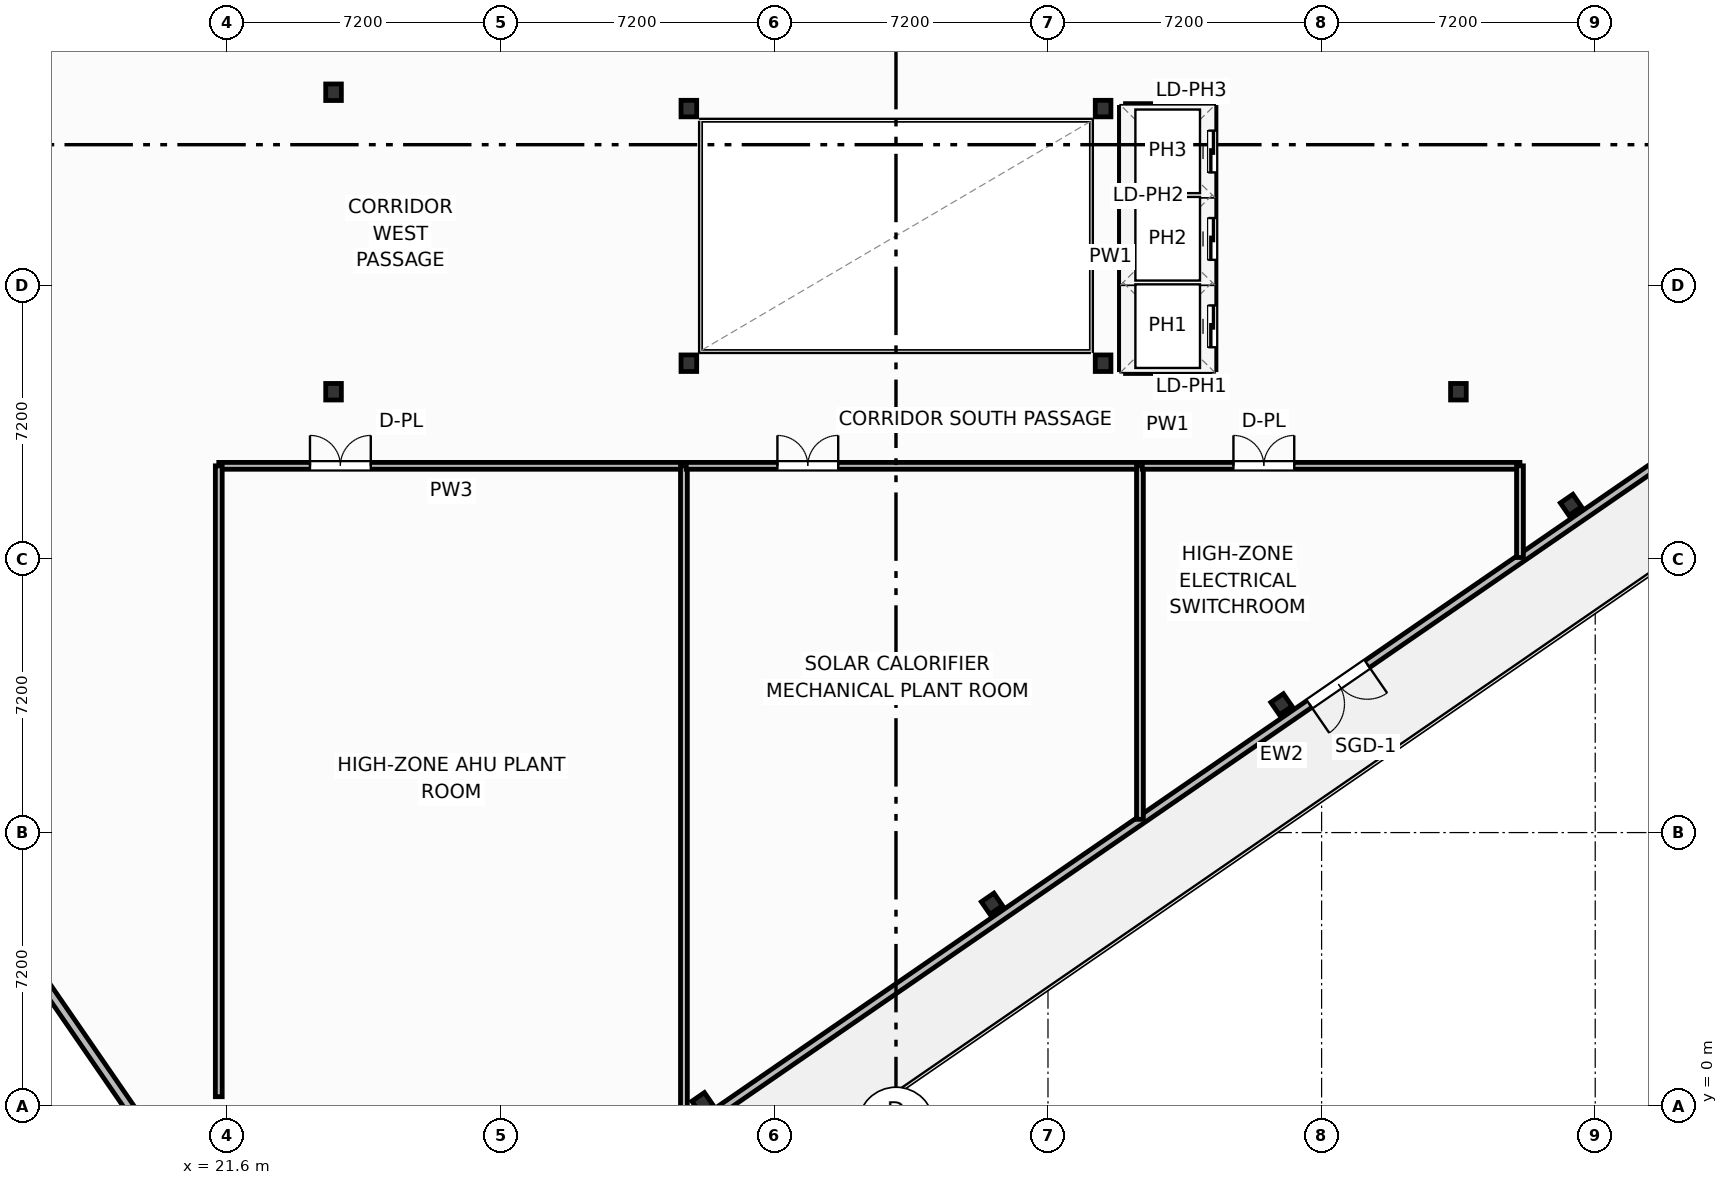
"""IFC4 building model, lengths in metres.
Left out: names, types, materials, properties, quantities, classifications, styles, units other than length and angle.
Written with IfcOpenShell. Run it as: python <this file> out.ifc"""

import sys

from ifc_helpers import new_model, si_unit, direction, frame, frame_2d, origin, origin_2d, place, context, subcontext, project, spatial, rectangle, i_section, extrude, element, fill, save


model = new_model("IFC4")
c1 = context("Model", 3, precision=1e-05, world=origin(), true_north=direction((0.0, 1.0)))
c2 = subcontext(c1, "Body", "Model", "MODEL_VIEW")
j1 = project(units=[si_unit("LENGTHUNIT", "METRE"), si_unit("PLANEANGLEUNIT", "RADIAN")], contexts=[c1])
p1 = place(None, origin())
s1 = spatial("IfcSite", under=j1, at=p1, CompositionType="ELEMENT")
p2 = place(p1, origin())
s2 = spatial("IfcBuilding", under=s1, at=p2, CompositionType="ELEMENT")
p3 = place(p2, frame((0.0, 0.0, 253.4)))
s3 = spatial("IfcBuildingStorey", under=s2, at=p3, CompositionType="ELEMENT", Elevation=253.4)
for number, where, z_axis, x_axis in (
    (1, (33.75, 19.55, 0.0), (0.0, 0.0, 1.0), (1.0, 0.0, 0.0)),
    (2, (44.65, 19.55, 0.0), (0.0, 0.0, 1.0), (1.0, 0.0, 0.0)),
    (3, (33.75, 26.25, 0.0), (0.0, 0.0, 1.0), (1.0, 0.0, 0.0)),
    (4, (44.65, 26.25, 0.0), (0.0, 0.0, 1.0), (1.0, 0.0, 0.0)),
    (5, (24.4, 18.8, 0.0), (0.0, 0.0, 1.0), (1.0, 0.0, 0.0)),
    (6, (24.4, 26.68, 0.0), (0.0, 0.0, 1.0), (1.0, 0.0, 0.0)),
    (7, (54.0, 18.8, 0.0), (0.0, 0.0, 1.0), (1.0, 0.0, 0.0)),
):
    element("IfcColumn", number, at=place(p3, frame(where, z_axis=z_axis, x_axis=x_axis)), inside=s3, PredefinedType="COLUMN", context=c2, shape_type="SweptSolid", body=[
        extrude(i_section(OverallWidth=0.412, OverallDepth=0.435, WebThickness=0.036, FlangeThickness=0.057, FilletRadius=0.025, at=origin_2d()), origin(), (0.0, 0.0, 1.0), 4.8),
    ])
for number, where, z_axis, x_axis in (
    (8, (34.107, 0.081, -0.32), (0.0, 0.0, 1.0), (0.824, 0.567, 0.0)),
    (9, (41.725, 5.328, -0.32), (0.0, 0.0, 1.0), (0.824, 0.567, 0.0)),
    (10, (49.343, 10.575, -0.32), (0.0, 0.0, 1.0), (0.824, 0.567, 0.0)),
    (11, (56.96, 15.823, -0.32), (0.0, 0.0, 1.0), (0.824, 0.567, 0.0)),
):
    element("IfcColumn", number, at=place(p3, frame(where, z_axis=z_axis, x_axis=x_axis)), inside=s3, PredefinedType="COLUMN", context=c2, shape_type="SweptSolid", body=[
        extrude(i_section(OverallWidth=0.401, OverallDepth=0.399, WebThickness=0.025, FlangeThickness=0.04, FilletRadius=0.022, at=origin_2d()), origin(), (0.0, 0.0, 1.0), 5.12),
    ])
p4 = place(p3, frame((71.07, 25.043, 0.0), z_axis=(0.0, 0.0, 1.0), x_axis=(-0.82353435434, -0.567266398812, 0.0)))
e12 = element("IfcWall", 12, at=p4, inside=s3, PredefinedType="SOLIDWALL", context=c2, shape_type="SweptSolid", body=[
    extrude(rectangle(XDim=52.2, YDim=0.22, at=frame_2d((26.1, 0.0))), origin(), (0.0, 0.0, 1.0), 3.83),
])
p5 = place(p4, frame((23.64, 0.0, 0.0)))
e13 = element("IfcOpeningElement", 13, at=p5, cuts=e12, PredefinedType="OPENING", context=c2, shape_type="SweptSolid", body=[
    extrude(rectangle(XDim=1.85, YDim=2.3, at=frame_2d((0.925, 1.15))), frame((0.0, 0.12, 0.0), z_axis=(0.0, -1.0, 0.0), x_axis=(1.0, 0.0, 0.0)), (0.0, 0.0, 1.0), 0.24),
])
p6 = place(p4, frame((0.55, 0.0, 0.75)))
e14 = element("IfcOpeningElement", 14, at=p6, cuts=e12, PredefinedType="OPENING", context=c2, shape_type="SweptSolid", body=[
    extrude(rectangle(XDim=1.85, YDim=1.75, at=frame_2d((0.925, 0.875))), frame((0.0, 0.12, 0.0), z_axis=(0.0, -1.0, 0.0), x_axis=(1.0, 0.0, 0.0)), (0.0, 0.0, 1.0), 0.24),
])
p7 = place(p4, frame((49.8, 0.0, 0.75)))
e15 = element("IfcOpeningElement", 15, at=p7, cuts=e12, PredefinedType="OPENING", context=c2, shape_type="SweptSolid", body=[
    extrude(rectangle(XDim=1.85, YDim=1.75, at=frame_2d((0.925, 0.875))), frame((0.0, 0.12, 0.0), z_axis=(0.0, -1.0, 0.0), x_axis=(1.0, 0.0, 0.0)), (0.0, 0.0, 1.0), 0.24),
])
p8 = place(p3, frame((7.331, 25.557, 0.0), z_axis=(0.0, 0.0, 1.0), x_axis=(0.823530664362, 0.567271755735, 0.0)))
e16 = element("IfcWall", 16, at=p8, inside=s3, PredefinedType="SOLIDWALL", context=c2, shape_type="SweptSolid", body=[
    extrude(rectangle(XDim=52.2, YDim=0.22, at=frame_2d((26.1, 0.0))), origin(), (0.0, 0.0, 1.0), 3.83),
])
p9 = place(p8, frame((28.025, 0.0, 0.0)))
e17 = element("IfcOpeningElement", 17, at=p9, cuts=e16, PredefinedType="OPENING", context=c2, shape_type="SweptSolid", body=[
    extrude(rectangle(XDim=1.85, YDim=2.3, at=frame_2d((0.925, 1.15))), frame((0.0, 0.12, 0.0), z_axis=(0.0, -1.0, 0.0), x_axis=(1.0, 0.0, 0.0)), (0.0, 0.0, 1.0), 0.24),
])
p10 = place(p8, frame((0.55, 0.0, 0.75)))
e18 = element("IfcOpeningElement", 18, at=p10, cuts=e16, PredefinedType="OPENING", context=c2, shape_type="SweptSolid", body=[
    extrude(rectangle(XDim=1.85, YDim=1.75, at=frame_2d((0.925, 0.875))), frame((0.0, 0.12, 0.0), z_axis=(0.0, -1.0, 0.0), x_axis=(1.0, 0.0, 0.0)), (0.0, 0.0, 1.0), 0.24),
])
p11 = place(p8, frame((49.8, 0.0, 0.75)))
e19 = element("IfcOpeningElement", 19, at=p11, cuts=e16, PredefinedType="OPENING", context=c2, shape_type="SweptSolid", body=[
    extrude(rectangle(XDim=1.85, YDim=1.75, at=frame_2d((0.925, 0.875))), frame((0.0, 0.12, 0.0), z_axis=(0.0, -1.0, 0.0), x_axis=(1.0, 0.0, 0.0)), (0.0, 0.0, 1.0), 0.24),
])
p12 = place(p3, frame((5.764, 19.229, 0.0), z_axis=(0.0, 0.0, 1.0), x_axis=(0.567265985498, -0.823534639039, 0.0)))
e20 = element("IfcWall", 20, at=p12, inside=s3, PredefinedType="SOLIDWALL", context=c2, shape_type="SweptSolid", body=[
    extrude(rectangle(XDim=27.934, YDim=0.24, at=frame_2d((13.967, 0.0))), origin(), (0.0, 0.0, 1.0), 3.83),
])
p13 = place(p3, frame((21.38, 16.85, 0.0), z_axis=(0.0, 0.0, 1.0), x_axis=(1.0, 0.0, 0.0)))
e21 = element("IfcWall", 21, at=p13, inside=s3, PredefinedType="PARTITIONING", context=c2, shape_type="SweptSolid", body=[
    extrude(rectangle(XDim=12.24, YDim=0.18, at=frame_2d((6.12, 0.0))), origin(), (0.0, 0.0, 1.0), 4.55),
])
p14 = place(p13, frame((2.4, 0.0, 0.0)))
e22 = element("IfcOpeningElement", 22, at=p14, cuts=e21, PredefinedType="OPENING", context=c2, shape_type="SweptSolid", body=[
    extrude(rectangle(XDim=1.6, YDim=2.05, at=frame_2d((0.8, 1.025))), frame((0.0, 0.1, 0.0), z_axis=(0.0, -1.0, 0.0), x_axis=(1.0, 0.0, 0.0)), (0.0, 0.0, 1.0), 0.2),
])
p15 = place(p3, frame((33.62, -0.713, 0.0), z_axis=(0.0, 0.0, 1.0), x_axis=(0.0, 1.0, 0.0)))
e23 = element("IfcWall", 23, at=p15, inside=s3, PredefinedType="PARTITIONING", context=c2, shape_type="SweptSolid", body=[
    extrude(rectangle(XDim=17.563, YDim=0.18, at=frame_2d((8.781, 0.0))), origin(), (0.0, 0.0, 1.0), 3.839),
])
p16 = place(p3, frame((21.38, 0.25, 0.0), z_axis=(0.0, 0.0, 1.0), x_axis=(0.0, 1.0, 0.0)))
e24 = element("IfcWall", 24, at=p16, inside=s3, PredefinedType="PARTITIONING", context=c2, shape_type="SweptSolid", body=[
    extrude(rectangle(XDim=16.6, YDim=0.18, at=frame_2d((8.3, 0.0))), origin(), (0.0, 0.0, 1.0), 4.55),
])
p17 = place(p3, frame((33.68, 16.85, 0.0), z_axis=(0.0, 0.0, 1.0), x_axis=(1.0, 0.0, 0.0)))
e25 = element("IfcWall", 25, at=p17, inside=s3, PredefinedType="PARTITIONING", context=c2, shape_type="SweptSolid", body=[
    extrude(rectangle(XDim=11.94, YDim=0.18, at=frame_2d((5.97, 0.0))), origin(), (0.0, 0.0, 1.0), 4.55),
])
p18 = place(p17, frame((2.4, 0.0, 0.0)))
e26 = element("IfcOpeningElement", 26, at=p18, cuts=e25, PredefinedType="OPENING", context=c2, shape_type="SweptSolid", body=[
    extrude(rectangle(XDim=1.6, YDim=2.05, at=frame_2d((0.8, 1.025))), frame((0.0, 0.1, 0.0), z_axis=(0.0, -1.0, 0.0), x_axis=(1.0, 0.0, 0.0)), (0.0, 0.0, 1.0), 0.2),
])
p19 = place(p3, frame((45.62, 7.55, 0.0), z_axis=(0.0, 0.0, 1.0), x_axis=(0.0, 1.0, 0.0)))
e27 = element("IfcWall", 27, at=p19, inside=s3, PredefinedType="PARTITIONING", context=c2, shape_type="SweptSolid", body=[
    extrude(rectangle(XDim=9.301, YDim=0.18, at=frame_2d((4.65, 0.0))), origin(), (0.0, 0.0, 1.0), 4.55),
])
p20 = place(p3, frame((45.68, 16.85, 0.0), z_axis=(0.0, 0.0, 1.0), x_axis=(1.0, 0.0, 0.0)))
e28 = element("IfcWall", 28, at=p20, inside=s3, PredefinedType="PARTITIONING", context=c2, shape_type="SweptSolid", body=[
    extrude(rectangle(XDim=9.94, YDim=0.18, at=frame_2d((4.97, 0.0))), origin(), (0.0, 0.0, 1.0), 4.55),
])
p21 = place(p20, frame((2.4, 0.0, 0.0)))
e29 = element("IfcOpeningElement", 29, at=p21, cuts=e28, PredefinedType="OPENING", context=c2, shape_type="SweptSolid", body=[
    extrude(rectangle(XDim=1.6, YDim=2.05, at=frame_2d((0.8, 1.025))), frame((0.0, 0.1, 0.0), z_axis=(0.0, -1.0, 0.0), x_axis=(1.0, 0.0, 0.0)), (0.0, 0.0, 1.0), 0.2),
])
p22 = place(p3, frame((55.62, 14.438, 0.0), z_axis=(0.0, 0.0, 1.0), x_axis=(0.0, 1.0, 0.0)))
e30 = element("IfcWall", 30, at=p22, inside=s3, PredefinedType="PARTITIONING", context=c2, shape_type="SweptSolid", body=[
    extrude(rectangle(XDim=2.412, YDim=0.18, at=frame_2d((1.206, 0.0))), origin(), (0.0, 0.0, 1.0), 4.55),
])
for number, where, z_axis, x_axis in (
    (31, (45.24, 21.675, 0.0), (0.0, 0.0, 1.0), (1.0, 0.0, 0.0)),
    (32, (45.24, 23.975, 0.0), (0.0, 0.0, 1.0), (1.0, 0.0, 0.0)),
):
    element("IfcWall", number, at=place(p3, frame(where, z_axis=z_axis, x_axis=x_axis)), inside=s3, PredefinedType="PARTITIONING", context=c2, shape_type="SweptSolid", body=[
        extrude(rectangle(XDim=2.22, YDim=0.2, at=frame_2d((1.11, 0.0))), origin(), (0.0, 0.0, 1.0), 4.55),
    ])
p23 = place(p3, frame((45.24, 19.38, 0.0), z_axis=(0.0, 0.0, 1.0), x_axis=(1.0, 0.0, 0.0)))
e33 = element("IfcWall", 33, at=p23, inside=s3, PredefinedType="PARTITIONING", context=c2, shape_type="SweptSolid", body=[
    extrude(rectangle(XDim=2.22, YDim=0.2, at=frame_2d((1.11, 0.0))), origin(), (0.0, 0.0, 1.0), 3.762),
])
p24 = place(p3, frame((45.24, 26.28, 0.0), z_axis=(0.0, 0.0, 1.0), x_axis=(1.0, 0.0, 0.0)))
e34 = element("IfcWall", 34, at=p24, inside=s3, PredefinedType="PARTITIONING", context=c2, shape_type="SweptSolid", body=[
    extrude(rectangle(XDim=2.22, YDim=0.2, at=frame_2d((1.11, 0.0))), origin(), (0.0, 0.0, 1.0), 4.55),
])
p25 = place(p3, frame((45.18, 19.38, 0.0), z_axis=(0.0, 0.0, 1.0), x_axis=(0.0, 1.0, 0.0)))
e35 = element("IfcWall", 35, at=p25, inside=s3, PredefinedType="PARTITIONING", context=c2, shape_type="SweptSolid", body=[
    extrude(rectangle(XDim=6.9, YDim=0.2, at=frame_2d((3.45, 0.0))), origin(), (0.0, 0.0, 1.0), 4.55),
])
p26 = place(p3, frame((47.52, 19.38, 0.0), z_axis=(0.0, 0.0, 1.0), x_axis=(0.0, 1.0, 0.0)))
e36 = element("IfcWall", 36, at=p26, inside=s3, PredefinedType="PARTITIONING", context=c2, shape_type="SweptSolid", body=[
    extrude(rectangle(XDim=6.9, YDim=0.2, at=frame_2d((3.45, 0.0))), origin(), (0.0, 0.0, 1.0), 4.55),
])
p27 = place(p26, frame((0.59, 0.0, 0.0)))
e37 = element("IfcOpeningElement", 37, at=p27, cuts=e36, PredefinedType="OPENING", context=c2, shape_type="SweptSolid", body=[
    extrude(rectangle(XDim=1.1, YDim=2.15, at=frame_2d((0.55, 1.075))), frame((0.0, 0.11, 0.0), z_axis=(0.0, -1.0, 0.0), x_axis=(1.0, 0.0, 0.0)), (0.0, 0.0, 1.0), 0.22),
])
p28 = place(p26, frame((2.89, 0.0, 0.0)))
e38 = element("IfcOpeningElement", 38, at=p28, cuts=e36, PredefinedType="OPENING", context=c2, shape_type="SweptSolid", body=[
    extrude(rectangle(XDim=1.1, YDim=2.15, at=frame_2d((0.55, 1.075))), frame((0.0, 0.11, 0.0), z_axis=(0.0, -1.0, 0.0), x_axis=(1.0, 0.0, 0.0)), (0.0, 0.0, 1.0), 0.22),
])
p29 = place(p26, frame((5.19, 0.0, 0.0)))
e39 = element("IfcOpeningElement", 39, at=p29, cuts=e36, PredefinedType="OPENING", context=c2, shape_type="SweptSolid", body=[
    extrude(rectangle(XDim=1.1, YDim=2.15, at=frame_2d((0.55, 1.075))), frame((0.0, 0.11, 0.0), z_axis=(0.0, -1.0, 0.0), x_axis=(1.0, 0.0, 0.0)), (0.0, 0.0, 1.0), 0.22),
])
p30 = place(p5, origin())
e40 = element("IfcDoor", 40, at=p30, inside=s3, OperationType="DOUBLE_DOOR_SINGLE_SWING", PredefinedType="DOOR", context=c2, shape_type="SweptSolid", body=[
    extrude(rectangle(XDim=1.85, YDim=2.3, at=frame_2d((0.925, 1.15))), frame((0.0, 0.025, 0.0), z_axis=(0.0, -1.0, 0.0), x_axis=(1.0, 0.0, 0.0)), (0.0, 0.0, 1.0), 0.05),
])
fill(e13, e40)
p31 = place(p14, origin())
e41 = element("IfcDoor", 41, at=p31, inside=s3, OperationType="DOUBLE_DOOR_SINGLE_SWING", PredefinedType="DOOR", context=c2, shape_type="SweptSolid", body=[
    extrude(rectangle(XDim=1.6, YDim=2.05, at=frame_2d((0.8, 1.025))), frame((0.0, 0.025, 0.0), z_axis=(0.0, -1.0, 0.0), x_axis=(1.0, 0.0, 0.0)), (0.0, 0.0, 1.0), 0.05),
])
fill(e22, e41)
p32 = place(p18, origin())
e42 = element("IfcDoor", 42, at=p32, inside=s3, OperationType="DOUBLE_DOOR_SINGLE_SWING", PredefinedType="DOOR", context=c2, shape_type="SweptSolid", body=[
    extrude(rectangle(XDim=1.6, YDim=2.05, at=frame_2d((0.8, 1.025))), frame((0.0, 0.025, 0.0), z_axis=(0.0, -1.0, 0.0), x_axis=(1.0, 0.0, 0.0)), (0.0, 0.0, 1.0), 0.05),
])
fill(e26, e42)
p33 = place(p21, origin())
e43 = element("IfcDoor", 43, at=p33, inside=s3, OperationType="DOUBLE_DOOR_SINGLE_SWING", PredefinedType="DOOR", context=c2, shape_type="SweptSolid", body=[
    extrude(rectangle(XDim=1.6, YDim=2.05, at=frame_2d((0.8, 1.025))), frame((0.0, 0.025, 0.0), z_axis=(0.0, -1.0, 0.0), x_axis=(1.0, 0.0, 0.0)), (0.0, 0.0, 1.0), 0.05),
])
fill(e29, e43)
p34 = place(p27, origin())
e44 = element("IfcDoor", 44, at=p34, inside=s3, OperationType="SLIDING_TO_LEFT", PredefinedType="DOOR", context=c2, shape_type="SweptSolid", body=[
    extrude(rectangle(XDim=1.1, YDim=2.15, at=frame_2d((0.55, 1.075))), frame((0.0, 0.025, 0.0), z_axis=(0.0, -1.0, 0.0), x_axis=(1.0, 0.0, 0.0)), (0.0, 0.0, 1.0), 0.05),
])
fill(e37, e44)
p35 = place(p28, origin())
e45 = element("IfcDoor", 45, at=p35, inside=s3, OperationType="SLIDING_TO_LEFT", PredefinedType="DOOR", context=c2, shape_type="SweptSolid", body=[
    extrude(rectangle(XDim=1.1, YDim=2.15, at=frame_2d((0.55, 1.075))), frame((0.0, 0.025, 0.0), z_axis=(0.0, -1.0, 0.0), x_axis=(1.0, 0.0, 0.0)), (0.0, 0.0, 1.0), 0.05),
])
fill(e38, e45)
p36 = place(p29, origin())
e46 = element("IfcDoor", 46, at=p36, inside=s3, OperationType="SLIDING_TO_LEFT", PredefinedType="DOOR", context=c2, shape_type="SweptSolid", body=[
    extrude(rectangle(XDim=1.1, YDim=2.15, at=frame_2d((0.55, 1.075))), frame((0.0, 0.025, 0.0), z_axis=(0.0, -1.0, 0.0), x_axis=(1.0, 0.0, 0.0)), (0.0, 0.0, 1.0), 0.05),
])
fill(e39, e46)
save(model, sys.argv[1])
